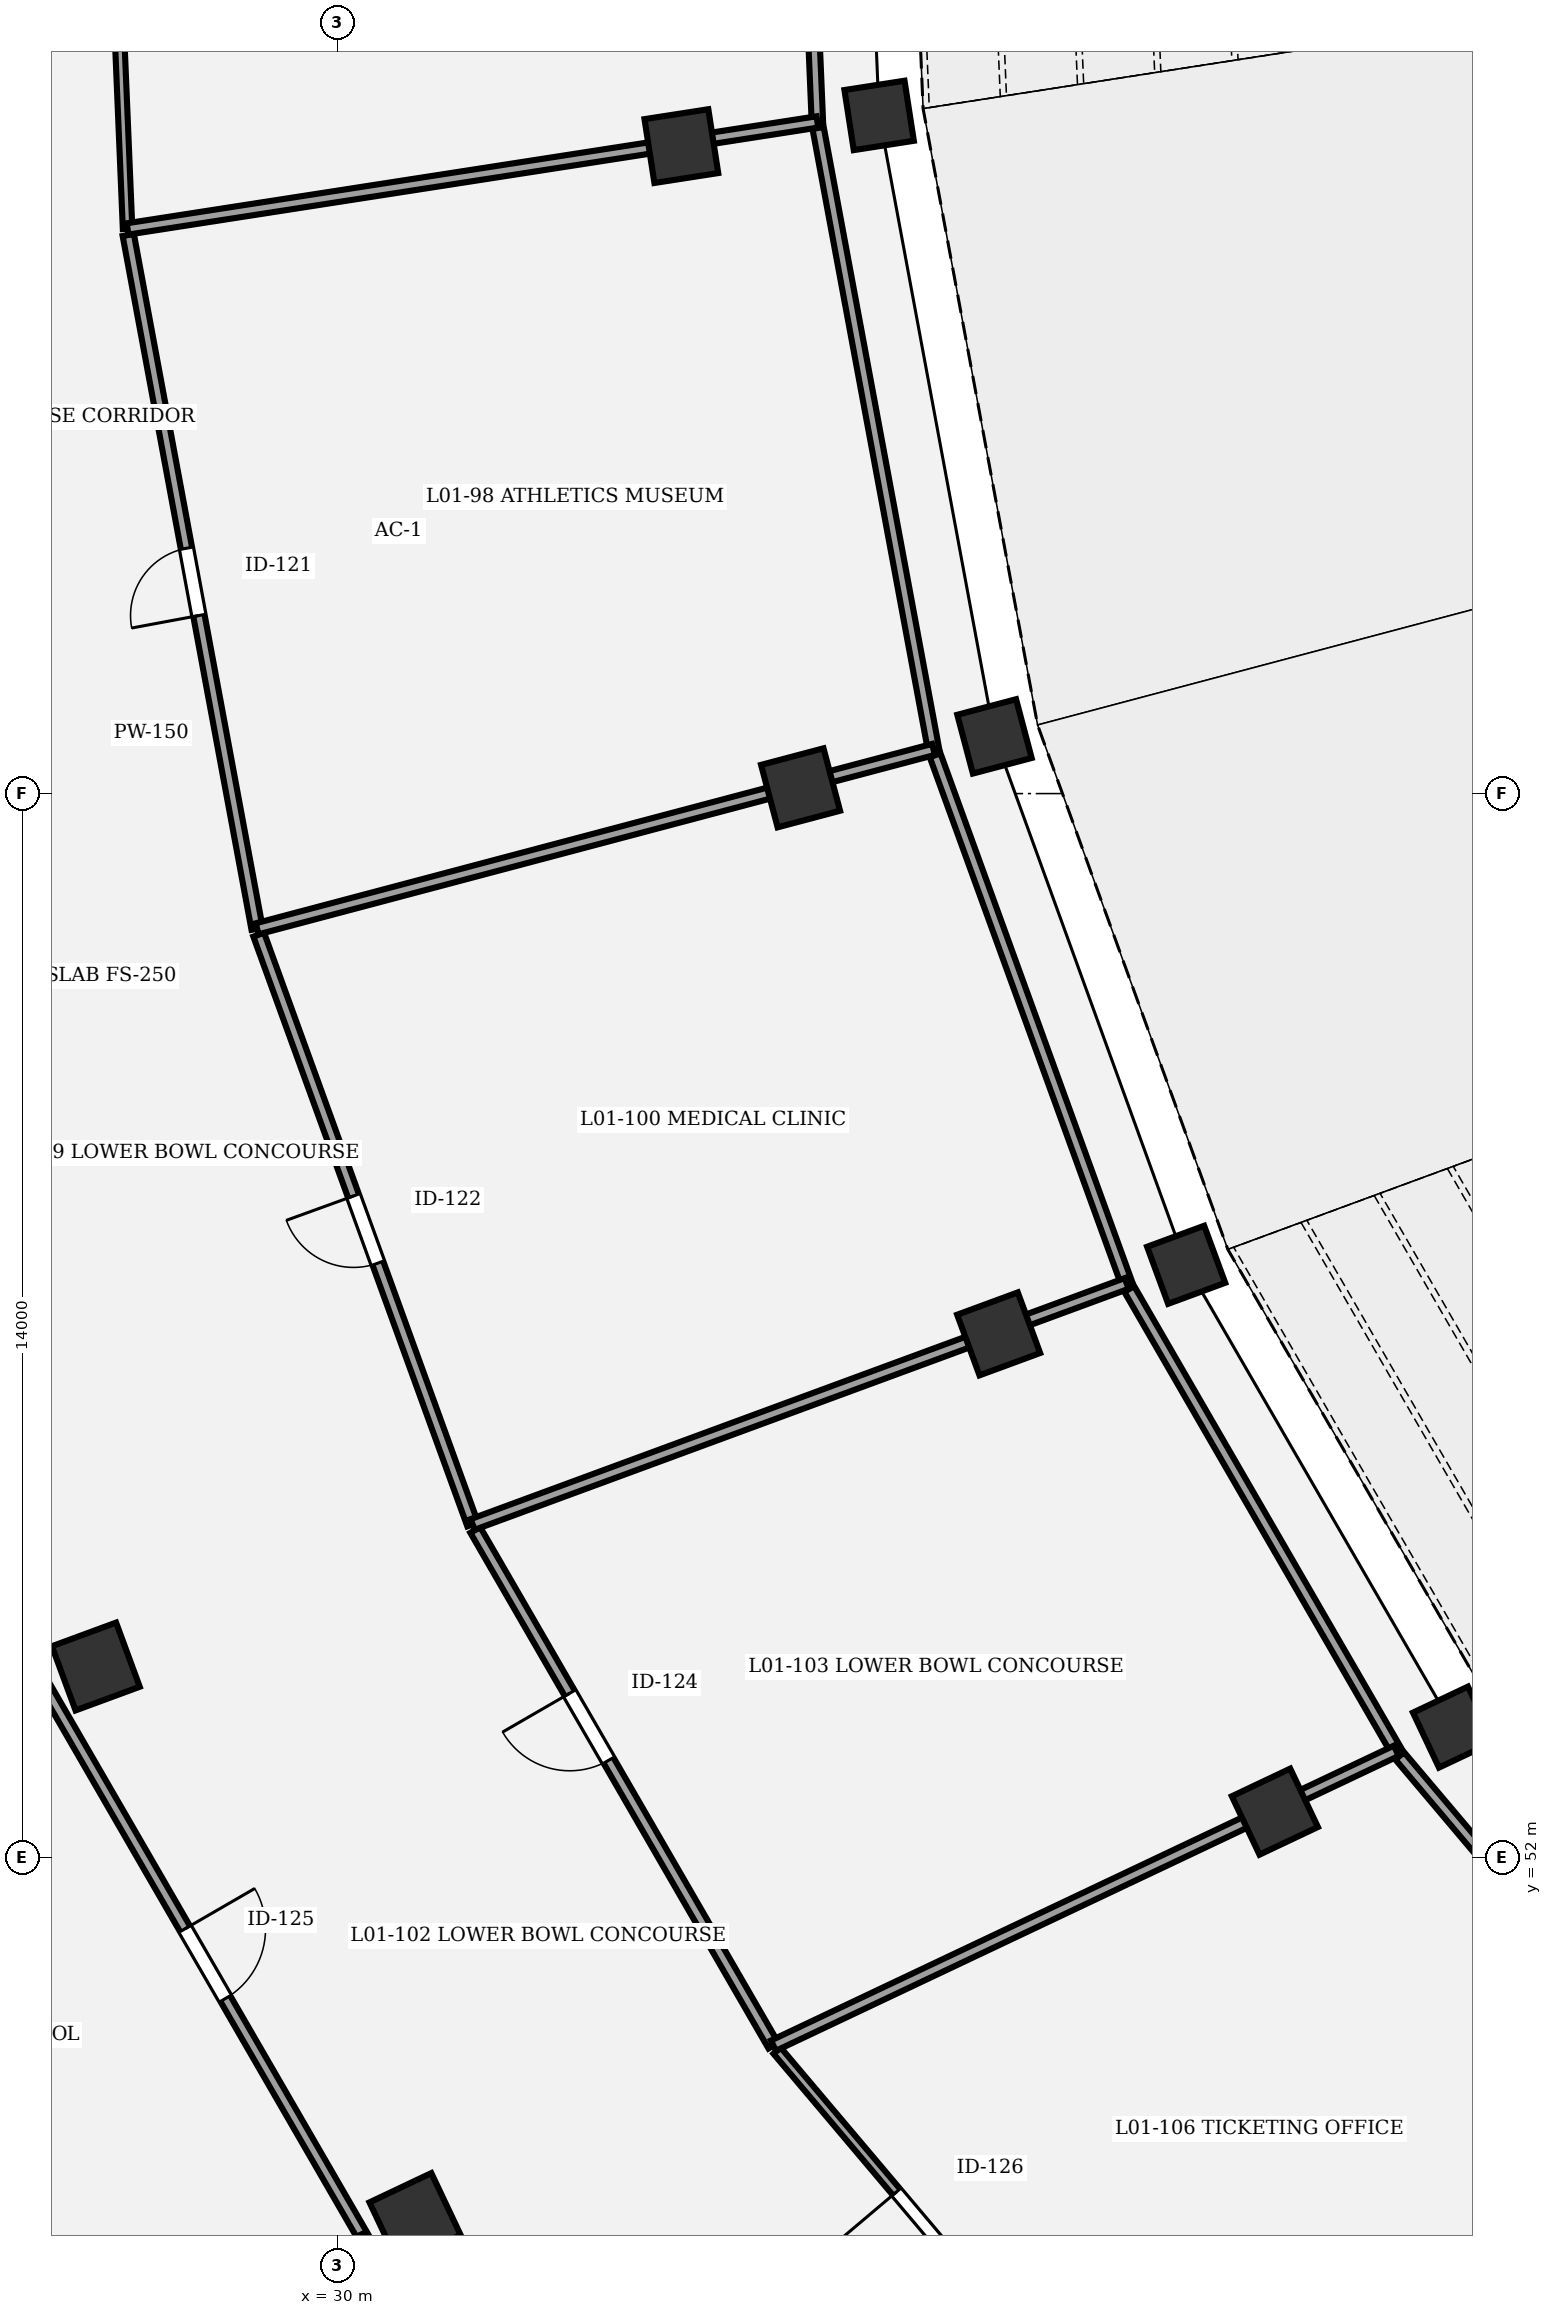
"""IFC4 building model, lengths in metres.
Left out: names, types, materials, properties, quantities, classifications, styles, units other than length and angle.
Written with IfcOpenShell. Run it as: python <this file> out.ifc"""

import sys

from ifc_helpers import new_model, si_unit, direction, frame, frame_2d, origin, origin_2d, place, context, subcontext, project, spatial, rectangle, extrude, element, fill, save


model = new_model("IFC4")
c1 = context("Model", 3, precision=1e-05, world=origin(), true_north=direction((0.0, 1.0)))
c2 = subcontext(c1, "Body", "Model", "MODEL_VIEW")
j1 = project(units=[si_unit("LENGTHUNIT", "METRE"), si_unit("PLANEANGLEUNIT", "RADIAN")], contexts=[c1])
p1 = place(None, origin())
s1 = spatial("IfcSite", under=j1, at=p1, CompositionType="ELEMENT")
p2 = place(p1, origin())
s2 = spatial("IfcBuilding", under=s1, at=p2, CompositionType="ELEMENT")
p3 = place(p2, frame((0.0, 0.0, 5.4)))
s3 = spatial("IfcBuildingStorey", under=s2, at=p3, CompositionType="ELEMENT", Elevation=5.4)
p4 = place(p3, frame((37.131, 74.922, 0.0), z_axis=(0.0, 0.0, 1.0), x_axis=(-0.98817491911, -0.153330783737, 0.0)))
e1 = element("IfcColumn", 1, at=p4, inside=s3, PredefinedType="COLUMN", context=c2, shape_type="SweptSolid", body=[
    extrude(rectangle(XDim=0.8, YDim=0.8, at=origin_2d()), origin(), (0.0, 0.0, 1.0), 4.8),
])
p5 = place(p3, frame((34.529, 74.518, 0.0), z_axis=(0.0, 0.0, 1.0), x_axis=(-0.98817491911, -0.153330783737, 0.0)))
e2 = element("IfcColumn", 2, at=p5, inside=s3, PredefinedType="COLUMN", context=c2, shape_type="SweptSolid", body=[
    extrude(rectangle(XDim=0.85, YDim=0.85, at=origin_2d()), origin(), (0.0, 0.0, 1.0), 4.8),
])
p6 = place(p3, frame((38.648, 66.752, 0.0), z_axis=(0.0, 0.0, 1.0), x_axis=(-0.966600102017, -0.256289373133, 0.0)))
e3 = element("IfcColumn", 3, at=p6, inside=s3, PredefinedType="COLUMN", context=c2, shape_type="SweptSolid", body=[
    extrude(rectangle(XDim=0.8, YDim=0.8, at=origin_2d()), origin(), (0.0, 0.0, 1.0), 4.8),
])
p7 = place(p3, frame((36.097, 66.076, 0.0), z_axis=(0.0, 0.0, 1.0), x_axis=(-0.966600102017, -0.256289373133, 0.0)))
e4 = element("IfcColumn", 4, at=p7, inside=s3, PredefinedType="COLUMN", context=c2, shape_type="SweptSolid", body=[
    extrude(rectangle(XDim=0.85, YDim=0.85, at=origin_2d()), origin(), (0.0, 0.0, 1.0), 4.8),
])
p8 = place(p3, frame((41.17, 59.801, 0.0), z_axis=(0.0, 0.0, 1.0), x_axis=(-0.938372433776, -0.34562577382, 0.0)))
e5 = element("IfcColumn", 5, at=p8, inside=s3, PredefinedType="COLUMN", context=c2, shape_type="SweptSolid", body=[
    extrude(rectangle(XDim=0.8, YDim=0.8, at=origin_2d()), origin(), (0.0, 0.0, 1.0), 4.8),
])
p9 = place(p3, frame((38.703, 58.892, 0.0), z_axis=(0.0, 0.0, 1.0), x_axis=(-0.938372433776, -0.34562577382, 0.0)))
e6 = element("IfcColumn", 6, at=p9, inside=s3, PredefinedType="COLUMN", context=c2, shape_type="SweptSolid", body=[
    extrude(rectangle(XDim=0.85, YDim=0.85, at=origin_2d()), origin(), (0.0, 0.0, 1.0), 4.8),
])
p10 = place(p3, frame((26.824, 54.516, 0.0), z_axis=(0.0, 0.0, 1.0), x_axis=(-0.938372433776, -0.34562577382, 0.0)))
e7 = element("IfcColumn", 7, at=p10, inside=s3, PredefinedType="COLUMN", context=c2, shape_type="SweptSolid", body=[
    extrude(rectangle(XDim=0.9, YDim=0.9, at=origin_2d()), origin(), (0.0, 0.0, 1.0), 4.8),
])
p11 = place(p3, frame((44.687, 53.719, 0.0), z_axis=(0.0, 0.0, 1.0), x_axis=(-0.903858661687, -0.4278311813, 0.0)))
e8 = element("IfcColumn", 8, at=p11, inside=s3, PredefinedType="COLUMN", context=c2, shape_type="SweptSolid", body=[
    extrude(rectangle(XDim=0.8, YDim=0.8, at=origin_2d()), origin(), (0.0, 0.0, 1.0), 4.8),
])
p12 = place(p3, frame((42.337, 52.606, 0.0), z_axis=(0.0, 0.0, 1.0), x_axis=(-0.903858661687, -0.4278311813, 0.0)))
e9 = element("IfcColumn", 9, at=p12, inside=s3, PredefinedType="COLUMN", context=c2, shape_type="SweptSolid", body=[
    extrude(rectangle(XDim=0.85, YDim=0.85, at=origin_2d()), origin(), (0.0, 0.0, 1.0), 4.8),
])
p13 = place(p3, frame((31.024, 47.252, 0.0), z_axis=(0.0, 0.0, 1.0), x_axis=(-0.903858661687, -0.4278311813, 0.0)))
e10 = element("IfcColumn", 10, at=p13, inside=s3, PredefinedType="COLUMN", context=c2, shape_type="SweptSolid", body=[
    extrude(rectangle(XDim=0.9, YDim=0.9, at=origin_2d()), origin(), (0.0, 0.0, 1.0), 4.8),
])
p14 = place(p3, frame((27.242, 73.429, 0.0), z_axis=(0.0, 0.0, 1.0), x_axis=(-0.041894479342, 0.999122040894, 0.0)))
e11 = element("IfcWall", 11, at=p14, inside=s3, PredefinedType="PARTITIONING", context=c2, shape_type="SweptSolid", body=[
    extrude(rectangle(XDim=13.543, YDim=0.125, at=frame_2d((6.771, 0.0))), origin(), (0.0, 0.0, 1.0), 3.55),
])
p15 = place(p14, frame((6.072, 0.0, 0.0)))
e12 = element("IfcOpeningElement", 12, at=p15, cuts=e11, PredefinedType="OPENING", context=c2, shape_type="SweptSolid", body=[
    extrude(rectangle(XDim=1.4, YDim=2.1, at=frame_2d((0.7, 1.05))), frame((0.0, 0.073, 0.0), z_axis=(0.0, -1.0, 0.0), x_axis=(1.0, 0.0, 0.0)), (0.0, 0.0, 1.0), 0.145),
])
p16 = place(p3, frame((28.947, 64.221, 0.0), z_axis=(0.0, 0.0, 1.0), x_axis=(-0.182600545941, 0.983187184936, 0.0)))
e13 = element("IfcWall", 13, at=p16, inside=s3, PredefinedType="PARTITIONING", context=c2, shape_type="SweptSolid", body=[
    extrude(rectangle(XDim=9.284, YDim=0.15, at=frame_2d((4.642, 0.0))), origin(), (0.0, 0.0, 1.0), 3.55),
])
p17 = place(p16, frame((4.192, 0.0, 0.0)))
e14 = element("IfcOpeningElement", 14, at=p17, cuts=e13, PredefinedType="OPENING", context=c2, shape_type="SweptSolid", body=[
    extrude(rectangle(XDim=0.9, YDim=2.2, at=frame_2d((0.45, 1.1))), frame((0.0, 0.085, 0.0), z_axis=(0.0, -1.0, 0.0), x_axis=(1.0, 0.0, 0.0)), (0.0, 0.0, 1.0), 0.17),
])
p18 = place(p3, frame((31.782, 56.385, 0.0), z_axis=(0.0, 0.0, 1.0), x_axis=(-0.341044733968, 0.940047067669, 0.0)))
e15 = element("IfcWall", 15, at=p18, inside=s3, PredefinedType="PARTITIONING", context=c2, shape_type="SweptSolid", body=[
    extrude(rectangle(XDim=8.254, YDim=0.15, at=frame_2d((4.127, 0.0))), origin(), (0.0, 0.0, 1.0), 3.55),
])
p19 = place(p18, frame((3.657, 0.0, 0.0)))
e16 = element("IfcOpeningElement", 16, at=p19, cuts=e15, PredefinedType="OPENING", context=c2, shape_type="SweptSolid", body=[
    extrude(rectangle(XDim=0.94, YDim=2.2, at=frame_2d((0.47, 1.1))), frame((0.0, 0.085, 0.0), z_axis=(0.0, -1.0, 0.0), x_axis=(1.0, 0.0, 0.0)), (0.0, 0.0, 1.0), 0.17),
])
p20 = place(p3, frame((35.74, 49.528, 0.0), z_axis=(0.0, 0.0, 1.0), x_axis=(-0.500584301803, 0.865687794063, 0.0)))
e17 = element("IfcWall", 17, at=p20, inside=s3, PredefinedType="PARTITIONING", context=c2, shape_type="SweptSolid", body=[
    extrude(rectangle(XDim=7.837, YDim=0.15, at=frame_2d((3.918, 0.0))), origin(), (0.0, 0.0, 1.0), 3.55),
])
p21 = place(p20, frame((4.335, 0.0, 0.0)))
e18 = element("IfcOpeningElement", 18, at=p21, cuts=e17, PredefinedType="OPENING", context=c2, shape_type="SweptSolid", body=[
    extrude(rectangle(XDim=1.02, YDim=2.2, at=frame_2d((0.51, 1.1))), frame((0.0, 0.085, 0.0), z_axis=(0.0, -1.0, 0.0), x_axis=(1.0, 0.0, 0.0)), (0.0, 0.0, 1.0), 0.17),
])
p22 = place(p3, frame((26.167, 54.231, 0.0), z_axis=(0.0, 0.0, 1.0), x_axis=(0.500559280672, -0.865702262059, 0.0)))
e19 = element("IfcWall", 19, at=p22, inside=s3, PredefinedType="PARTITIONING", context=c2, shape_type="SweptSolid", body=[
    extrude(rectangle(XDim=8.375, YDim=0.15, at=frame_2d((4.187, 0.0))), origin(), (0.0, 0.0, 1.0), 3.55),
])
p23 = place(p22, frame((3.657, 0.0, 0.0)))
e20 = element("IfcOpeningElement", 20, at=p23, cuts=e19, PredefinedType="OPENING", context=c2, shape_type="SweptSolid", body=[
    extrude(rectangle(XDim=1.06, YDim=2.2, at=frame_2d((0.53, 1.1))), frame((0.0, 0.085, 0.0), z_axis=(0.0, -1.0, 0.0), x_axis=(1.0, 0.0, 0.0)), (0.0, 0.0, 1.0), 0.17),
])
p24 = place(p3, frame((40.807, 43.518, 0.0), z_axis=(0.0, 0.0, 1.0), x_axis=(-0.645180817826, 0.764029915847, 0.0)))
e21 = element("IfcWall", 21, at=p24, inside=s3, PredefinedType="PARTITIONING", context=c2, shape_type="SweptSolid", body=[
    extrude(rectangle(XDim=7.779, YDim=0.125, at=frame_2d((3.89, 0.0))), origin(), (0.0, 0.0, 1.0), 3.55),
])
p25 = place(p24, frame((4.246, 0.0, 0.0)))
e22 = element("IfcOpeningElement", 22, at=p25, cuts=e21, PredefinedType="OPENING", context=c2, shape_type="SweptSolid", body=[
    extrude(rectangle(XDim=1.1, YDim=2.2, at=frame_2d((0.55, 1.1))), frame((0.0, 0.073, 0.0), z_axis=(0.0, -1.0, 0.0), x_axis=(1.0, 0.0, 0.0)), (0.0, 0.0, 1.0), 0.145),
])
p26 = place(p3, frame((35.81, 86.96, 0.0), z_axis=(0.0, 0.0, 1.0), x_axis=(0.041909219346, -0.999121422718, 0.0)))
e23 = element("IfcWall", 23, at=p26, inside=s3, PredefinedType="PARTITIONING", context=c2, shape_type="SweptSolid", body=[
    extrude(rectangle(XDim=12.135, YDim=0.15, at=frame_2d((6.067, 0.0))), origin(), (0.0, 0.0, 1.0), 3.55),
])
p27 = place(p3, frame((36.318, 74.836, 0.0), z_axis=(0.0, 0.0, 1.0), x_axis=(-0.988188135357, -0.153245584407, 0.0)))
e24 = element("IfcWall", 24, at=p27, inside=s3, PredefinedType="PARTITIONING", context=c2, shape_type="SweptSolid", body=[
    extrude(rectangle(XDim=9.184, YDim=0.15, at=frame_2d((4.592, 0.0))), origin(), (0.0, 0.0, 1.0), 3.55),
])
p28 = place(p3, frame((36.327, 74.757, 0.0), z_axis=(0.0, 0.0, 1.0), x_axis=(0.182614898171, -0.983184519287, 0.0)))
e25 = element("IfcWall", 25, at=p28, inside=s3, PredefinedType="PARTITIONING", context=c2, shape_type="SweptSolid", body=[
    extrude(rectangle(XDim=8.316, YDim=0.15, at=frame_2d((4.158, 0.0))), origin(), (0.0, 0.0, 1.0), 3.55),
])
p29 = place(p3, frame((37.846, 66.581, 0.0), z_axis=(0.0, 0.0, 1.0), x_axis=(-0.96658744027, -0.256337122383, 0.0)))
e26 = element("IfcWall", 26, at=p29, inside=s3, PredefinedType="PARTITIONING", context=c2, shape_type="SweptSolid", body=[
    extrude(rectangle(XDim=9.207, YDim=0.15, at=frame_2d((4.604, 0.0))), origin(), (0.0, 0.0, 1.0), 3.55),
])
p30 = place(p3, frame((37.867, 66.504, 0.0), z_axis=(0.0, 0.0, 1.0), x_axis=(0.34104817416, -0.940045819576, 0.0)))
e27 = element("IfcWall", 27, at=p30, inside=s3, PredefinedType="PARTITIONING", context=c2, shape_type="SweptSolid", body=[
    extrude(rectangle(XDim=7.392, YDim=0.15, at=frame_2d((3.696, 0.0))), origin(), (0.0, 0.0, 1.0), 3.55),
])
p31 = place(p3, frame((40.388, 59.555, 0.0), z_axis=(0.0, 0.0, 1.0), x_axis=(-0.93834402583, -0.345702891496, 0.0)))
e28 = element("IfcWall", 28, at=p31, inside=s3, PredefinedType="PARTITIONING", context=c2, shape_type="SweptSolid", body=[
    extrude(rectangle(XDim=9.171, YDim=0.15, at=frame_2d((4.585, 0.0))), origin(), (0.0, 0.0, 1.0), 3.55),
])
p32 = place(p3, frame((40.421, 59.482, 0.0), z_axis=(0.0, 0.0, 1.0), x_axis=(0.500549390525, -0.865707980583, 0.0)))
e29 = element("IfcWall", 29, at=p32, inside=s3, PredefinedType="PARTITIONING", context=c2, shape_type="SweptSolid", body=[
    extrude(rectangle(XDim=7.018, YDim=0.15, at=frame_2d((3.509, 0.0))), origin(), (0.0, 0.0, 1.0), 3.55),
])
p33 = place(p3, frame((43.934, 53.406, 0.0), z_axis=(0.0, 0.0, 1.0), x_axis=(-0.903860081227, -0.427828182292, 0.0)))
e30 = element("IfcWall", 30, at=p33, inside=s3, PredefinedType="PARTITIONING", context=c2, shape_type="SweptSolid", body=[
    extrude(rectangle(XDim=9.066, YDim=0.15, at=frame_2d((4.533, 0.0))), origin(), (0.0, 0.0, 1.0), 3.55),
])
p34 = place(p3, frame((30.359, 46.981, 0.0), z_axis=(0.0, 0.0, 1.0), x_axis=(-0.903854859666, -0.427839213559, 0.0)))
e31 = element("IfcWall", 31, at=p34, inside=s3, PredefinedType="PARTITIONING", context=c2, shape_type="SweptSolid", body=[
    extrude(rectangle(XDim=7.814, YDim=0.15, at=frame_2d((3.907, 0.0))), origin(), (0.0, 0.0, 1.0), 3.55),
])
p35 = place(p3, frame((43.98, 53.34, 0.0), z_axis=(0.0, 0.0, 1.0), x_axis=(0.64516899819, -0.764039896716, 0.0)))
e32 = element("IfcWall", 32, at=p35, inside=s3, PredefinedType="PARTITIONING", context=c2, shape_type="SweptSolid", body=[
    extrude(rectangle(XDim=6.967, YDim=0.15, at=frame_2d((3.483, 0.0))), origin(), (0.0, 0.0, 1.0), 3.55),
])
p36 = place(p3, frame((48.475, 48.017, 0.0), z_axis=(0.0, 0.0, 1.0), x_axis=(-0.862518193496, -0.506026052579, 0.0)))
e33 = element("IfcWall", 33, at=p36, inside=s3, PredefinedType="PARTITIONING", context=c2, shape_type="SweptSolid", body=[
    extrude(rectangle(XDim=8.89, YDim=0.15, at=frame_2d((4.445, 0.0))), origin(), (0.0, 0.0, 1.0), 3.55),
])
p37 = place(p17, origin())
e34 = element("IfcDoor", 34, at=p37, inside=s3, OperationType="SINGLE_SWING_LEFT", PredefinedType="DOOR", context=c2, shape_type="SweptSolid", body=[
    extrude(rectangle(XDim=0.9, YDim=2.2, at=frame_2d((0.45, 1.1))), frame((0.0, 0.025, 0.0), z_axis=(0.0, -1.0, 0.0), x_axis=(1.0, 0.0, 0.0)), (0.0, 0.0, 1.0), 0.05),
])
fill(e14, e34)
p38 = place(p19, origin())
e35 = element("IfcDoor", 35, at=p38, inside=s3, OperationType="SINGLE_SWING_RIGHT", PredefinedType="DOOR", context=c2, shape_type="SweptSolid", body=[
    extrude(rectangle(XDim=0.94, YDim=2.2, at=frame_2d((0.47, 1.1))), frame((0.0, 0.025, 0.0), z_axis=(0.0, -1.0, 0.0), x_axis=(1.0, 0.0, 0.0)), (0.0, 0.0, 1.0), 0.05),
])
fill(e16, e35)
p39 = place(p21, origin())
e36 = element("IfcDoor", 36, at=p39, inside=s3, OperationType="SINGLE_SWING_RIGHT", PredefinedType="DOOR", context=c2, shape_type="SweptSolid", body=[
    extrude(rectangle(XDim=1.02, YDim=2.2, at=frame_2d((0.51, 1.1))), frame((0.0, 0.025, 0.0), z_axis=(0.0, -1.0, 0.0), x_axis=(1.0, 0.0, 0.0)), (0.0, 0.0, 1.0), 0.05),
])
fill(e18, e36)
p40 = place(p23, origin())
e37 = element("IfcDoor", 37, at=p40, inside=s3, OperationType="SINGLE_SWING_LEFT", PredefinedType="DOOR", context=c2, shape_type="SweptSolid", body=[
    extrude(rectangle(XDim=1.06, YDim=2.2, at=frame_2d((0.53, 1.1))), frame((0.0, 0.025, 0.0), z_axis=(0.0, -1.0, 0.0), x_axis=(1.0, 0.0, 0.0)), (0.0, 0.0, 1.0), 0.05),
])
fill(e20, e37)
p41 = place(p25, origin())
e38 = element("IfcDoor", 38, at=p41, inside=s3, OperationType="SINGLE_SWING_RIGHT", PredefinedType="DOOR", context=c2, shape_type="SweptSolid", body=[
    extrude(rectangle(XDim=1.1, YDim=2.2, at=frame_2d((0.55, 1.1))), frame((0.0, 0.025, 0.0), z_axis=(0.0, -1.0, 0.0), x_axis=(1.0, 0.0, 0.0)), (0.0, 0.0, 1.0), 0.05),
])
fill(e22, e38)
save(model, sys.argv[1])
